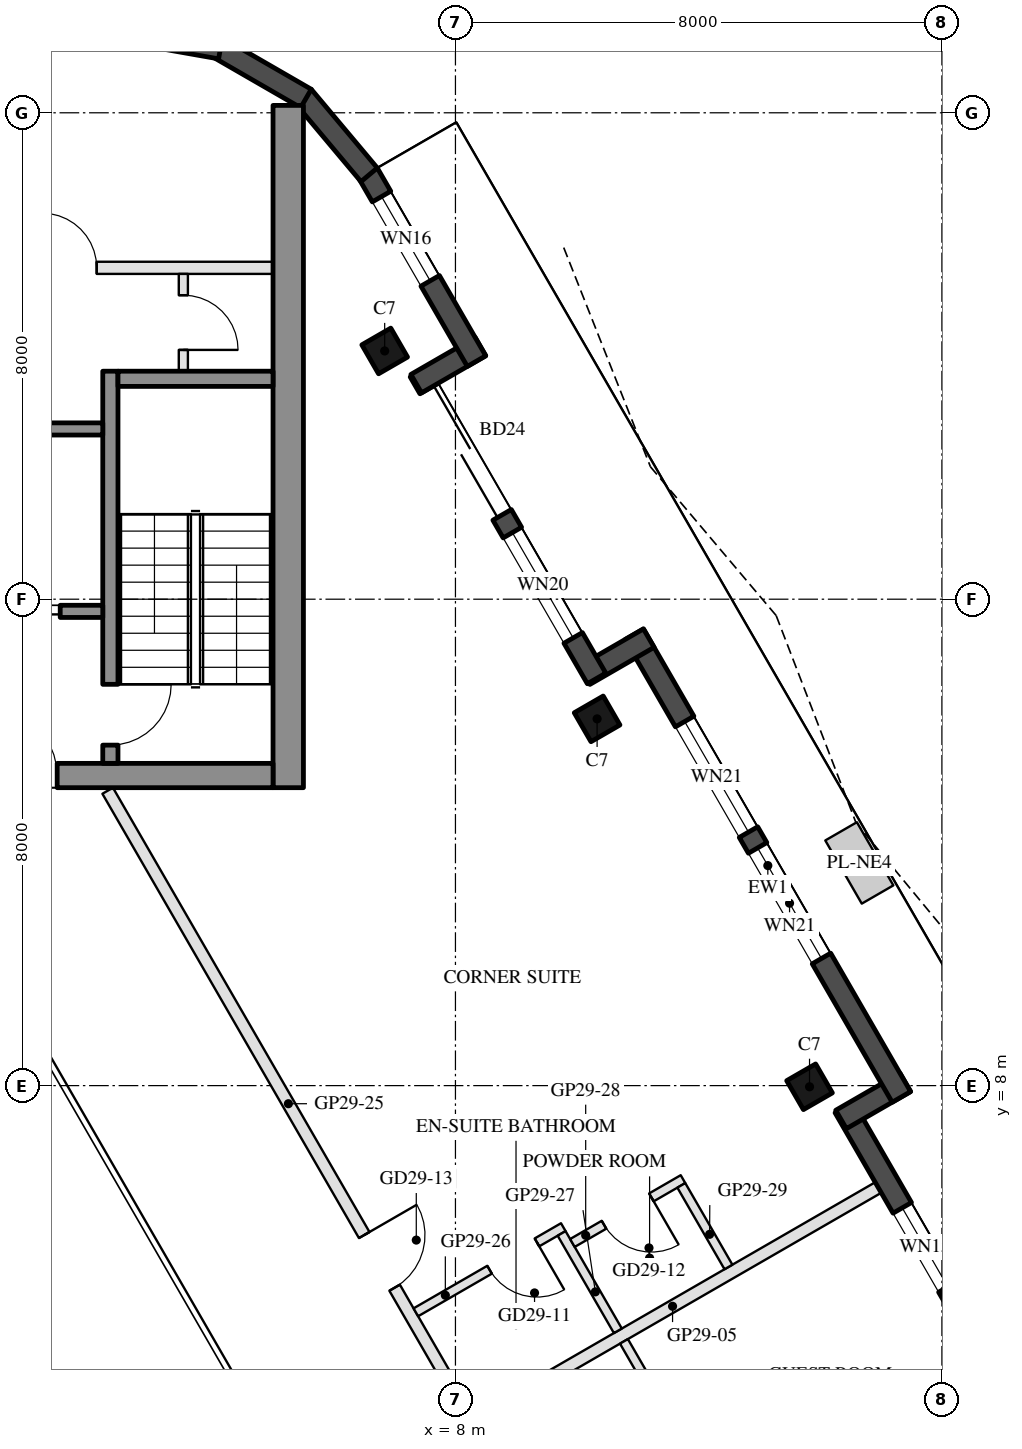
"""IFC4 building model, lengths in metres.
Left out: names, types, materials, properties, quantities, classifications, styles, units other than length and angle.
Written with IfcOpenShell. Run it as: python <this file> out.ifc"""

import sys

from ifc_helpers import new_model, si_unit, direction, frame, frame_2d, origin, origin_2d, place, context, subcontext, project, spatial, rectangle, hollow_rectangle, extrude, boolean, halfspace, element, fill, save


model = new_model("IFC4")
c1 = context("Model", 3, precision=1e-05, world=origin(), true_north=direction((0.0, 1.0)))
c2 = subcontext(c1, "Body", "Model", "MODEL_VIEW")
j1 = project(units=[si_unit("LENGTHUNIT", "METRE"), si_unit("PLANEANGLEUNIT", "RADIAN")], contexts=[c1])
p1 = place(None, origin())
s1 = spatial("IfcSite", under=j1, at=p1, CompositionType="ELEMENT")
p2 = place(p1, origin())
s2 = spatial("IfcBuilding", under=s1, at=p2, CompositionType="ELEMENT")
p3 = place(p2, frame((0.0, 0.0, 291.1)))
s3 = spatial("IfcBuildingStorey", under=s2, at=p3, CompositionType="ELEMENT", Elevation=291.1)
p4 = place(p3, frame((13.823, 7.981, 0.0), z_axis=(0.0, 0.0, 1.0), x_axis=(-0.5, 0.866025403784, 0.0)))
e1 = element("IfcColumn", 1, at=p4, inside=s3, PredefinedType="COLUMN", context=c2, shape_type="SweptSolid", body=[
    boolean("DIFFERENCE", extrude(hollow_rectangle(XDim=0.55, YDim=0.55, WallThickness=0.025, at=origin_2d()), origin(), (0.0, 0.0, 1.0), 3.7), halfspace(frame((0.0, 0.0, 0.031), z_axis=(0.0, 0.0, 1.0), x_axis=(1.0, 0.0, 0.0)), True)),
])
p5 = place(p3, frame((10.33, 14.032, 0.0), z_axis=(0.0, 0.0, 1.0), x_axis=(-0.5, 0.866025403784, 0.0)))
e2 = element("IfcColumn", 2, at=p5, inside=s3, PredefinedType="COLUMN", context=c2, shape_type="SweptSolid", body=[
    boolean("DIFFERENCE", extrude(hollow_rectangle(XDim=0.55, YDim=0.55, WallThickness=0.025, at=origin_2d()), origin(), (0.0, 0.0, 1.0), 3.7), halfspace(frame((0.0, 0.0, 0.034), z_axis=(0.0, 0.0, 1.0), x_axis=(1.0, 0.0, 0.0)), True)),
])
p6 = place(p3, frame((6.836, 20.083, 0.0), z_axis=(0.0, 0.0, 1.0), x_axis=(-0.5, 0.866025403784, 0.0)))
e3 = element("IfcColumn", 3, at=p6, inside=s3, PredefinedType="COLUMN", context=c2, shape_type="SweptSolid", body=[
    boolean("DIFFERENCE", extrude(hollow_rectangle(XDim=0.55, YDim=0.55, WallThickness=0.025, at=origin_2d()), origin(), (0.0, 0.0, 1.0), 3.7), halfspace(frame((0.0, 0.0, 0.04), z_axis=(0.0, 0.0, 1.0), x_axis=(1.0, 0.0, 0.0)), True)),
])
p7 = place(p3, frame((17.308, 2.595, 0.0), z_axis=(0.0, 0.0, 1.0), x_axis=(-0.500005339912, 0.866022320763, 0.0)))
e4 = element("IfcWall", 4, at=p7, inside=s3, PredefinedType="SOLIDWALL", context=c2, shape_type="SweptSolid", body=[
    extrude(rectangle(XDim=5.827, YDim=0.35, at=frame_2d((2.914, 0.0))), origin(), (0.0, 0.0, 1.0), 3.55),
])
p8 = place(p7, frame((0.32, 0.0, 0.0)))
e5 = element("IfcOpeningElement", 5, at=p8, cuts=e4, PredefinedType="OPENING", context=c2, shape_type="SweptSolid", body=[
    extrude(rectangle(XDim=1.8, YDim=2.4, at=frame_2d((0.9, 1.2))), frame((0.0, 0.185, 0.0), z_axis=(0.0, -1.0, 0.0), x_axis=(1.0, 0.0, 0.0)), (0.0, 0.0, 1.0), 0.37),
])
p9 = place(p7, frame((2.42, 0.0, 0.3)))
e6 = element("IfcOpeningElement", 6, at=p9, cuts=e4, PredefinedType="OPENING", context=c2, shape_type="SweptSolid", body=[
    extrude(rectangle(XDim=1.5, YDim=2.65, at=frame_2d((0.75, 1.325))), frame((0.0, 0.185, 0.0), z_axis=(0.0, -1.0, 0.0), x_axis=(1.0, 0.0, 0.0)), (0.0, 0.0, 1.0), 0.37),
])
p10 = place(p3, frame((14.342, 7.443, 0.0), z_axis=(0.0, 0.0, 1.0), x_axis=(0.866092288191, 0.499884134912, 0.0)))
e7 = element("IfcWall", 7, at=p10, inside=s3, PredefinedType="SOLIDWALL", context=c2, shape_type="SweptSolid", body=[
    extrude(rectangle(XDim=1.22, YDim=0.35, at=frame_2d((0.61, 0.0))), origin(), (0.0, 0.0, 1.0), 3.55),
])
p11 = place(p3, frame((15.334, 7.814, 0.0), z_axis=(0.0, 0.0, 1.0), x_axis=(-0.499999835575, 0.866025498715, 0.0)))
e8 = element("IfcWall", 8, at=p11, inside=s3, PredefinedType="SOLIDWALL", context=c2, shape_type="SweptSolid", body=[
    extrude(rectangle(XDim=8.787, YDim=0.35, at=frame_2d((4.394, 0.0))), origin(), (0.0, 0.0, 1.0), 3.55),
])
p12 = place(p11, frame((2.629, 0.0, 0.3)))
e9 = element("IfcOpeningElement", 9, at=p12, cuts=e8, PredefinedType="OPENING", context=c2, shape_type="SweptSolid", body=[
    extrude(rectangle(XDim=2.1, YDim=2.65, at=frame_2d((1.05, 1.325))), frame((0.0, 0.185, 0.0), z_axis=(0.0, -1.0, 0.0), x_axis=(1.0, 0.0, 0.0)), (0.0, 0.0, 1.0), 0.37),
])
p13 = place(p11, frame((5.029, 0.0, 0.3)))
e10 = element("IfcOpeningElement", 10, at=p13, cuts=e8, PredefinedType="OPENING", context=c2, shape_type="SweptSolid", body=[
    extrude(rectangle(XDim=2.1, YDim=2.65, at=frame_2d((1.05, 1.325))), frame((0.0, 0.185, 0.0), z_axis=(0.0, -1.0, 0.0), x_axis=(1.0, 0.0, 0.0)), (0.0, 0.0, 1.0), 0.37),
])
p14 = place(p3, frame((11.18, 15.36, 0.0), z_axis=(0.0, 0.0, 1.0), x_axis=(-0.866055662726, -0.499947586314, 0.0)))
e11 = element("IfcWall", 11, at=p14, inside=s3, PredefinedType="SOLIDWALL", context=c2, shape_type="SweptSolid", body=[
    extrude(rectangle(XDim=1.22, YDim=0.35, at=frame_2d((0.61, 0.0))), origin(), (0.0, 0.0, 1.0), 3.55),
])
p15 = place(p3, frame((10.321, 14.697, 0.0), z_axis=(0.0, 0.0, 1.0), x_axis=(-0.500005339912, 0.866022320763, 0.0)))
e12 = element("IfcWall", 12, at=p15, inside=s3, PredefinedType="SOLIDWALL", context=c2, shape_type="SweptSolid", body=[
    extrude(rectangle(XDim=5.827, YDim=0.35, at=frame_2d((2.914, 0.0))), origin(), (0.0, 0.0, 1.0), 3.55),
])
p16 = place(p15, frame((3.107, 0.0, 0.0)))
e13 = element("IfcOpeningElement", 13, at=p16, cuts=e12, PredefinedType="OPENING", context=c2, shape_type="SweptSolid", body=[
    extrude(rectangle(XDim=2.4, YDim=2.4, at=frame_2d((1.2, 1.2))), frame((0.0, 0.185, 0.0), z_axis=(0.0, -1.0, 0.0), x_axis=(1.0, 0.0, 0.0)), (0.0, 0.0, 1.0), 0.37),
])
p17 = place(p15, frame((0.77, 0.0, 0.3)))
e14 = element("IfcOpeningElement", 14, at=p17, cuts=e12, PredefinedType="OPENING", context=c2, shape_type="SweptSolid", body=[
    extrude(rectangle(XDim=2.0, YDim=2.65, at=frame_2d((1.0, 1.325))), frame((0.0, 0.185, 0.0), z_axis=(0.0, -1.0, 0.0), x_axis=(1.0, 0.0, 0.0)), (0.0, 0.0, 1.0), 0.37),
])
p18 = place(p3, frame((7.354, 19.545, 0.0), z_axis=(0.0, 0.0, 1.0), x_axis=(0.865955602162, 0.500120880472, 0.0)))
e15 = element("IfcWall", 15, at=p18, inside=s3, PredefinedType="SOLIDWALL", context=c2, shape_type="SweptSolid", body=[
    extrude(rectangle(XDim=1.22, YDim=0.35, at=frame_2d((0.61, 0.0))), origin(), (0.0, 0.0, 1.0), 3.55),
])
p19 = place(p3, frame((8.347, 19.916, 0.0), z_axis=(0.0, 0.0, 1.0), x_axis=(-0.500010763282, 0.866019189511, 0.0)))
e16 = element("IfcWall", 16, at=p19, inside=s3, PredefinedType="SOLIDWALL", context=c2, shape_type="SweptSolid", body=[
    extrude(rectangle(XDim=3.567, YDim=0.35, at=frame_2d((1.784, 0.0))), origin(), (0.0, 0.0, 1.0), 3.55),
])
p20 = place(p19, frame((1.525, 0.0, 0.3)))
e17 = element("IfcOpeningElement", 17, at=p20, cuts=e16, PredefinedType="OPENING", context=c2, shape_type="SweptSolid", body=[
    extrude(rectangle(XDim=1.6, YDim=2.65, at=frame_2d((0.8, 1.325))), frame((0.0, 0.185, 0.0), z_axis=(0.0, -1.0, 0.0), x_axis=(1.0, 0.0, 0.0)), (0.0, 0.0, 1.0), 0.37),
])
for number, where, z_axis, x_axis in (
    (18, (6.581, 22.98, 0.0), (0.0, 0.0, 1.0), (-0.643, 0.766, 0.0)),
    (19, (5.542, 24.236, 0.0), (0.0, 0.0, 1.0), (-0.866, 0.5, 0.0)),
    (20, (4.135, 25.059, 0.0), (0.0, 0.0, 1.0), (-0.985, 0.174, 0.0)),
):
    element("IfcWall", number, at=place(p3, frame(where, z_axis=z_axis, x_axis=x_axis)), inside=s3, PredefinedType="SOLIDWALL", context=c2, shape_type="SweptSolid", body=[
        extrude(rectangle(XDim=1.689, YDim=0.35, at=frame_2d((0.845, 0.0))), origin(), (0.0, 0.0, 1.0), 3.55),
    ])
p21 = place(p3, frame((5.25, 12.9, 0.0), z_axis=(0.0, 0.0, 1.0), x_axis=(0.0, 1.0, 0.0)))
e21 = element("IfcWall", 21, at=p21, inside=s3, PredefinedType="SHEAR", context=c2, shape_type="SweptSolid", body=[
    extrude(rectangle(XDim=11.222, YDim=0.5, at=frame_2d((5.611, 0.0))), origin(), (0.0, 0.0, 1.0), 3.5),
])
p22 = place(p3, frame((5.0, 13.1, 0.0), z_axis=(0.0, 0.0, 1.0), x_axis=(-1.0, 0.0, 0.0)))
e22 = element("IfcWall", 22, at=p22, inside=s3, PredefinedType="SHEAR", context=c2, shape_type="SweptSolid", body=[
    extrude(rectangle(XDim=10.0, YDim=0.4, at=frame_2d((5.0, 0.0))), origin(), (0.0, 0.0, 1.0), 3.5),
])
p23 = place(p22, frame((3.55, 0.0, 0.0)))
e23 = element("IfcOpeningElement", 23, at=p23, cuts=e22, PredefinedType="OPENING", context=c2, shape_type="SweptSolid", body=[
    extrude(rectangle(XDim=1.1, YDim=2.1, at=frame_2d((0.55, 1.05))), frame((0.0, 0.21, 0.0), z_axis=(0.0, -1.0, 0.0), x_axis=(1.0, 0.0, 0.0)), (0.0, 0.0, 1.0), 0.42),
])
p24 = place(p22, frame((5.85, 0.0, 0.0)))
e24 = element("IfcOpeningElement", 24, at=p24, cuts=e22, PredefinedType="OPENING", context=c2, shape_type="SweptSolid", body=[
    extrude(rectangle(XDim=1.4, YDim=2.1, at=frame_2d((0.7, 1.05))), frame((0.0, 0.21, 0.0), z_axis=(0.0, -1.0, 0.0), x_axis=(1.0, 0.0, 0.0)), (0.0, 0.0, 1.0), 0.42),
])
p25 = place(p3, frame((2.325, 13.3, 0.0), z_axis=(0.0, 0.0, 1.0), x_axis=(0.0, 1.0, 0.0)))
e25 = element("IfcWall", 25, at=p25, inside=s3, PredefinedType="SHEAR", context=c2, shape_type="SweptSolid", body=[
    extrude(rectangle(XDim=6.45, YDim=0.25, at=frame_2d((3.225, 0.0))), origin(), (0.0, 0.0, 1.0), 3.5),
])
p26 = place(p25, frame((0.3, 0.0, 0.0)))
e26 = element("IfcOpeningElement", 26, at=p26, cuts=e25, PredefinedType="OPENING", context=c2, shape_type="SweptSolid", body=[
    extrude(rectangle(XDim=1.0, YDim=2.1, at=frame_2d((0.5, 1.05))), frame((0.0, 0.135, 0.0), z_axis=(0.0, -1.0, 0.0), x_axis=(1.0, 0.0, 0.0)), (0.0, 0.0, 1.0), 0.27),
])
p27 = place(p3, frame((5.0, 19.625, 0.0), z_axis=(0.0, 0.0, 1.0), x_axis=(-1.0, 0.0, 0.0)))
e27 = element("IfcWall", 27, at=p27, inside=s3, PredefinedType="SHEAR", context=c2, shape_type="SweptSolid", body=[
    extrude(rectangle(XDim=2.55, YDim=0.25, at=frame_2d((1.275, 0.0))), origin(), (0.0, 0.0, 1.0), 3.5),
])
p28 = place(p3, frame((2.2, 18.8, 0.0), z_axis=(0.0, 0.0, 1.0), x_axis=(-1.0, 0.0, 0.0)))
e28 = element("IfcWall", 28, at=p28, inside=s3, PredefinedType="SHEAR", context=c2, shape_type="SweptSolid", body=[
    extrude(rectangle(XDim=2.8, YDim=0.2, at=frame_2d((1.4, 0.0))), origin(), (0.0, 0.0, 1.0), 3.5),
])
p29 = place(p3, frame((2.2, 15.8, 0.0), z_axis=(0.0, 0.0, 1.0), x_axis=(-1.0, 0.0, 0.0)))
e29 = element("IfcWall", 29, at=p29, inside=s3, PredefinedType="SHEAR", context=c2, shape_type="SweptSolid", body=[
    extrude(rectangle(XDim=2.8, YDim=0.2, at=frame_2d((1.4, 0.0))), origin(), (0.0, 0.0, 1.0), 3.5),
])
p30 = place(p29, frame((0.7, 0.0, 0.0)))
e30 = element("IfcOpeningElement", 30, at=p30, cuts=e29, PredefinedType="OPENING", context=c2, shape_type="SweptSolid", body=[
    extrude(rectangle(XDim=1.2, YDim=2.1, at=frame_2d((0.6, 1.05))), frame((0.0, 0.11, 0.0), z_axis=(0.0, -1.0, 0.0), x_axis=(1.0, 0.0, 0.0)), (0.0, 0.0, 1.0), 0.22),
])
p31 = place(p3, frame((5.0, 21.45, 0.0), z_axis=(0.0, 0.0, 1.0), x_axis=(-1.0, 0.0, 0.0)))
e31 = element("IfcWall", 31, at=p31, inside=s3, PredefinedType="PARTITIONING", context=c2, shape_type="SweptSolid", body=[
    extrude(rectangle(XDim=5.4, YDim=0.2, at=frame_2d((2.7, 0.0))), origin(), (0.0, 0.0, 1.0), 3.5),
])
p32 = place(p31, frame((2.9, 0.0, 0.0)))
e32 = element("IfcOpeningElement", 32, at=p32, cuts=e31, PredefinedType="OPENING", context=c2, shape_type="SweptSolid", body=[
    extrude(rectangle(XDim=0.9, YDim=2.1, at=frame_2d((0.45, 1.05))), frame((0.0, 0.11, 0.0), z_axis=(0.0, -1.0, 0.0), x_axis=(1.0, 0.0, 0.0)), (0.0, 0.0, 1.0), 0.22),
])
p33 = place(p3, frame((3.525, 19.75, 0.0), z_axis=(0.0, 0.0, 1.0), x_axis=(0.0, 1.0, 0.0)))
e33 = element("IfcWall", 33, at=p33, inside=s3, PredefinedType="PARTITIONING", context=c2, shape_type="SweptSolid", body=[
    extrude(rectangle(XDim=1.6, YDim=0.15, at=frame_2d((0.8, 0.0))), origin(), (0.0, 0.0, 1.0), 3.5),
])
p34 = place(p33, frame((0.35, 0.0, 0.0)))
e34 = element("IfcOpeningElement", 34, at=p34, cuts=e33, PredefinedType="OPENING", context=c2, shape_type="SweptSolid", body=[
    extrude(rectangle(XDim=0.9, YDim=2.1, at=frame_2d((0.45, 1.05))), frame((0.0, 0.085, 0.0), z_axis=(0.0, -1.0, 0.0), x_axis=(1.0, 0.0, 0.0)), (0.0, 0.0, 1.0), 0.17),
])
p35 = place(p3, frame((14.953, 6.324, 0.0), z_axis=(0.0, 0.0, 1.0), x_axis=(-0.866030491634, -0.499991187483, 0.0)))
e35 = element("IfcWall", 35, at=p35, inside=s3, PredefinedType="PARTITIONING", context=c2, shape_type="SweptSolid", body=[
    extrude(rectangle(XDim=7.812, YDim=0.2, at=frame_2d((3.906, 0.0))), origin(), (0.0, 0.0, 1.0), 3.16),
])
p36 = place(p3, frame((11.639, 2.29, 0.0), z_axis=(0.0, 0.0, 1.0), x_axis=(-0.500115958453, 0.865958444789, 0.0)))
e36 = element("IfcWall", 36, at=p36, inside=s3, PredefinedType="PARTITIONING", context=c2, shape_type="SweptSolid", body=[
    extrude(rectangle(XDim=1.736, YDim=0.15, at=frame_2d((0.868, 0.0))), origin(), (0.0, 0.0, 1.0), 3.05),
])
p37 = place(p3, frame((2.281, 12.85, 0.0), z_axis=(0.0, 0.0, 1.0), x_axis=(0.500002143212, -0.866024166397, 0.0)))
e37 = element("IfcWall", 37, at=p37, inside=s3, PredefinedType="PARTITIONING", context=c2, shape_type="SweptSolid", body=[
    extrude(rectangle(XDim=11.888, YDim=0.2, at=frame_2d((5.944, 0.0))), origin(), (0.0, 0.0, 1.0), 3.05),
])
p38 = place(p37, frame((8.438, 0.0, 0.0)))
e38 = element("IfcOpeningElement", 38, at=p38, cuts=e37, PredefinedType="OPENING", context=c2, shape_type="SweptSolid", body=[
    extrude(rectangle(XDim=1.0, YDim=2.1, at=frame_2d((0.5, 1.05))), frame((0.0, 0.11, 0.0), z_axis=(0.0, -1.0, 0.0), x_axis=(1.0, 0.0, 0.0)), (0.0, 0.0, 1.0), 0.22),
])
p39 = place(p3, frame((9.774, 5.672, 0.0), z_axis=(0.0, 0.0, 1.0), x_axis=(-0.866056369097, -0.49994636267, 0.0)))
e39 = element("IfcWall", 39, at=p39, inside=s3, PredefinedType="PARTITIONING", context=c2, shape_type="SweptSolid", body=[
    extrude(rectangle(XDim=2.8, YDim=0.15, at=frame_2d((1.4, 0.0))), origin(), (0.0, 0.0, 1.0), 3.05),
])
p40 = place(p39, frame((0.5, 0.0, 0.0)))
e40 = element("IfcOpeningElement", 40, at=p40, cuts=e39, PredefinedType="OPENING", context=c2, shape_type="SweptSolid", body=[
    extrude(rectangle(XDim=0.9, YDim=2.1, at=frame_2d((0.45, 1.05))), frame((0.0, 0.085, 0.0), z_axis=(0.0, -1.0, 0.0), x_axis=(1.0, 0.0, 0.0)), (0.0, 0.0, 1.0), 0.17),
])
p41 = place(p3, frame((10.671, 3.967, 0.0), z_axis=(0.0, 0.0, 1.0), x_axis=(-0.500042316284, 0.866000971088, 0.0)))
e41 = element("IfcWall", 41, at=p41, inside=s3, PredefinedType="PARTITIONING", context=c2, shape_type="SweptSolid", body=[
    extrude(rectangle(XDim=1.85, YDim=0.15, at=frame_2d((0.925, 0.0))), origin(), (0.0, 0.0, 1.0), 3.05),
])
p42 = place(p3, frame((11.742, 6.462, 0.0), z_axis=(0.0, 0.0, 1.0), x_axis=(-0.866009402589, -0.500027713859, 0.0)))
e42 = element("IfcWall", 42, at=p42, inside=s3, PredefinedType="PARTITIONING", context=c2, shape_type="SweptSolid", body=[
    extrude(rectangle(XDim=2.1, YDim=0.15, at=frame_2d((1.05, 0.0))), origin(), (0.0, 0.0, 1.0), 3.55),
])
p43 = place(p42, frame((0.6, 0.0, 0.0)))
e43 = element("IfcOpeningElement", 43, at=p43, cuts=e42, PredefinedType="OPENING", context=c2, shape_type="SweptSolid", body=[
    extrude(rectangle(XDim=0.9, YDim=2.1, at=frame_2d((0.45, 1.05))), frame((0.0, 0.085, 0.0), z_axis=(0.0, -1.0, 0.0), x_axis=(1.0, 0.0, 0.0)), (0.0, 0.0, 1.0), 0.17),
])
p44 = place(p3, frame((12.49, 5.017, 0.0), z_axis=(0.0, 0.0, 1.0), x_axis=(-0.499967891604, 0.866043940782, 0.0)))
e44 = element("IfcWall", 44, at=p44, inside=s3, PredefinedType="PARTITIONING", context=c2, shape_type="SweptSolid", body=[
    extrude(rectangle(XDim=1.55, YDim=0.15, at=frame_2d((0.775, 0.0))), origin(), (0.0, 0.0, 1.0), 3.55),
])
p45 = place(p9, origin())
e45 = element("IfcWindow", 45, at=p45, inside=s3, PartitioningType="SINGLE_PANEL", PredefinedType="WINDOW", context=c2, shape_type="SweptSolid", body=[
    extrude(rectangle(XDim=1.5, YDim=2.65, at=frame_2d((0.75, 1.325))), frame((0.0, 0.03, 0.0), z_axis=(0.0, -1.0, 0.0), x_axis=(1.0, 0.0, 0.0)), (0.0, 0.0, 1.0), 0.06),
])
fill(e6, e45)
p46 = place(p12, origin())
e46 = element("IfcWindow", 46, at=p46, inside=s3, PartitioningType="SINGLE_PANEL", PredefinedType="WINDOW", context=c2, shape_type="SweptSolid", body=[
    extrude(rectangle(XDim=2.1, YDim=2.65, at=frame_2d((1.05, 1.325))), frame((0.0, 0.03, 0.0), z_axis=(0.0, -1.0, 0.0), x_axis=(1.0, 0.0, 0.0)), (0.0, 0.0, 1.0), 0.06),
])
fill(e9, e46)
p47 = place(p13, origin())
e47 = element("IfcWindow", 47, at=p47, inside=s3, PartitioningType="SINGLE_PANEL", PredefinedType="WINDOW", context=c2, shape_type="SweptSolid", body=[
    extrude(rectangle(XDim=2.1, YDim=2.65, at=frame_2d((1.05, 1.325))), frame((0.0, 0.03, 0.0), z_axis=(0.0, -1.0, 0.0), x_axis=(1.0, 0.0, 0.0)), (0.0, 0.0, 1.0), 0.06),
])
fill(e10, e47)
p48 = place(p16, frame((2.4, 0.0, 0.0), z_axis=(0.0, 0.0, 1.0), x_axis=(-1.0, 0.0, 0.0)))
e48 = element("IfcDoor", 48, at=p48, inside=s3, OperationType="SLIDING_TO_LEFT", PredefinedType="DOOR", context=c2, shape_type="SweptSolid", body=[
    extrude(rectangle(XDim=2.4, YDim=2.4, at=frame_2d((1.2, 1.2))), frame((0.0, 0.025, 0.0), z_axis=(0.0, -1.0, 0.0), x_axis=(1.0, 0.0, 0.0)), (0.0, 0.0, 1.0), 0.05),
])
fill(e13, e48)
p49 = place(p17, origin())
e49 = element("IfcWindow", 49, at=p49, inside=s3, PartitioningType="SINGLE_PANEL", PredefinedType="WINDOW", context=c2, shape_type="SweptSolid", body=[
    extrude(rectangle(XDim=2.0, YDim=2.65, at=frame_2d((1.0, 1.325))), frame((0.0, 0.03, 0.0), z_axis=(0.0, -1.0, 0.0), x_axis=(1.0, 0.0, 0.0)), (0.0, 0.0, 1.0), 0.06),
])
fill(e14, e49)
p50 = place(p20, origin())
e50 = element("IfcWindow", 50, at=p50, inside=s3, PartitioningType="SINGLE_PANEL", PredefinedType="WINDOW", context=c2, shape_type="SweptSolid", body=[
    extrude(rectangle(XDim=1.6, YDim=2.65, at=frame_2d((0.8, 1.325))), frame((0.0, 0.03, 0.0), z_axis=(0.0, -1.0, 0.0), x_axis=(1.0, 0.0, 0.0)), (0.0, 0.0, 1.0), 0.06),
])
fill(e17, e50)
p51 = place(p30, origin())
e51 = element("IfcDoor", 51, at=p51, inside=s3, OperationType="DOUBLE_DOOR_SLIDING", PredefinedType="DOOR", context=c2, shape_type="SweptSolid", body=[
    extrude(rectangle(XDim=1.2, YDim=2.1, at=frame_2d((0.6, 1.05))), frame((0.0, 0.025, 0.0), z_axis=(0.0, -1.0, 0.0), x_axis=(1.0, 0.0, 0.0)), (0.0, 0.0, 1.0), 0.05),
])
fill(e30, e51)
p52 = place(p34, frame((0.9, 0.0, 0.0), z_axis=(0.0, 0.0, 1.0), x_axis=(-1.0, 0.0, 0.0)))
e52 = element("IfcDoor", 52, at=p52, inside=s3, OperationType="SINGLE_SWING_RIGHT", PredefinedType="DOOR", context=c2, shape_type="SweptSolid", body=[
    extrude(rectangle(XDim=0.9, YDim=2.1, at=frame_2d((0.45, 1.05))), frame((0.0, 0.025, 0.0), z_axis=(0.0, -1.0, 0.0), x_axis=(1.0, 0.0, 0.0)), (0.0, 0.0, 1.0), 0.05),
])
fill(e34, e52)
p53 = place(p32, frame((0.9, 0.0, 0.0), z_axis=(0.0, 0.0, 1.0), x_axis=(-1.0, 0.0, 0.0)))
e53 = element("IfcDoor", 53, at=p53, inside=s3, OperationType="SINGLE_SWING_LEFT", PredefinedType="DOOR", context=c2, shape_type="SweptSolid", body=[
    extrude(rectangle(XDim=0.9, YDim=2.1, at=frame_2d((0.45, 1.05))), frame((0.0, 0.025, 0.0), z_axis=(0.0, -1.0, 0.0), x_axis=(1.0, 0.0, 0.0)), (0.0, 0.0, 1.0), 0.05),
])
fill(e32, e53)
p54 = place(p23, frame((1.1, 0.0, 0.0), z_axis=(0.0, 0.0, 1.0), x_axis=(-1.0, 0.0, 0.0)))
e54 = element("IfcDoor", 54, at=p54, inside=s3, OperationType="SINGLE_SWING_LEFT", PredefinedType="DOOR", context=c2, shape_type="SweptSolid", body=[
    extrude(rectangle(XDim=1.1, YDim=2.1, at=frame_2d((0.55, 1.05))), frame((0.0, 0.025, 0.0), z_axis=(0.0, -1.0, 0.0), x_axis=(1.0, 0.0, 0.0)), (0.0, 0.0, 1.0), 0.05),
])
fill(e23, e54)
p55 = place(p26, frame((1.0, 0.0, 0.0), z_axis=(0.0, 0.0, 1.0), x_axis=(-1.0, 0.0, 0.0)))
e55 = element("IfcDoor", 55, at=p55, inside=s3, OperationType="SINGLE_SWING_LEFT", PredefinedType="DOOR", context=c2, shape_type="SweptSolid", body=[
    extrude(rectangle(XDim=1.0, YDim=2.1, at=frame_2d((0.5, 1.05))), frame((0.0, 0.025, 0.0), z_axis=(0.0, -1.0, 0.0), x_axis=(1.0, 0.0, 0.0)), (0.0, 0.0, 1.0), 0.05),
])
fill(e26, e55)
p56 = place(p40, origin())
e56 = element("IfcDoor", 56, at=p56, inside=s3, OperationType="SINGLE_SWING_LEFT", PredefinedType="DOOR", context=c2, shape_type="SweptSolid", body=[
    extrude(rectangle(XDim=0.9, YDim=2.1, at=frame_2d((0.45, 1.05))), frame((0.0, 0.025, 0.0), z_axis=(0.0, -1.0, 0.0), x_axis=(1.0, 0.0, 0.0)), (0.0, 0.0, 1.0), 0.05),
])
fill(e40, e56)
p57 = place(p43, origin())
e57 = element("IfcDoor", 57, at=p57, inside=s3, OperationType="SINGLE_SWING_LEFT", PredefinedType="DOOR", context=c2, shape_type="SweptSolid", body=[
    extrude(rectangle(XDim=0.9, YDim=2.1, at=frame_2d((0.45, 1.05))), frame((0.0, 0.025, 0.0), z_axis=(0.0, -1.0, 0.0), x_axis=(1.0, 0.0, 0.0)), (0.0, 0.0, 1.0), 0.05),
])
fill(e43, e57)
p58 = place(p38, origin())
e58 = element("IfcDoor", 58, at=p58, inside=s3, OperationType="SINGLE_SWING_LEFT", PredefinedType="DOOR", context=c2, shape_type="SweptSolid", body=[
    extrude(rectangle(XDim=1.0, YDim=2.1, at=frame_2d((0.5, 1.05))), frame((0.0, 0.025, 0.0), z_axis=(0.0, -1.0, 0.0), x_axis=(1.0, 0.0, 0.0)), (0.0, 0.0, 1.0), 0.05),
])
fill(e38, e58)
save(model, sys.argv[1])
